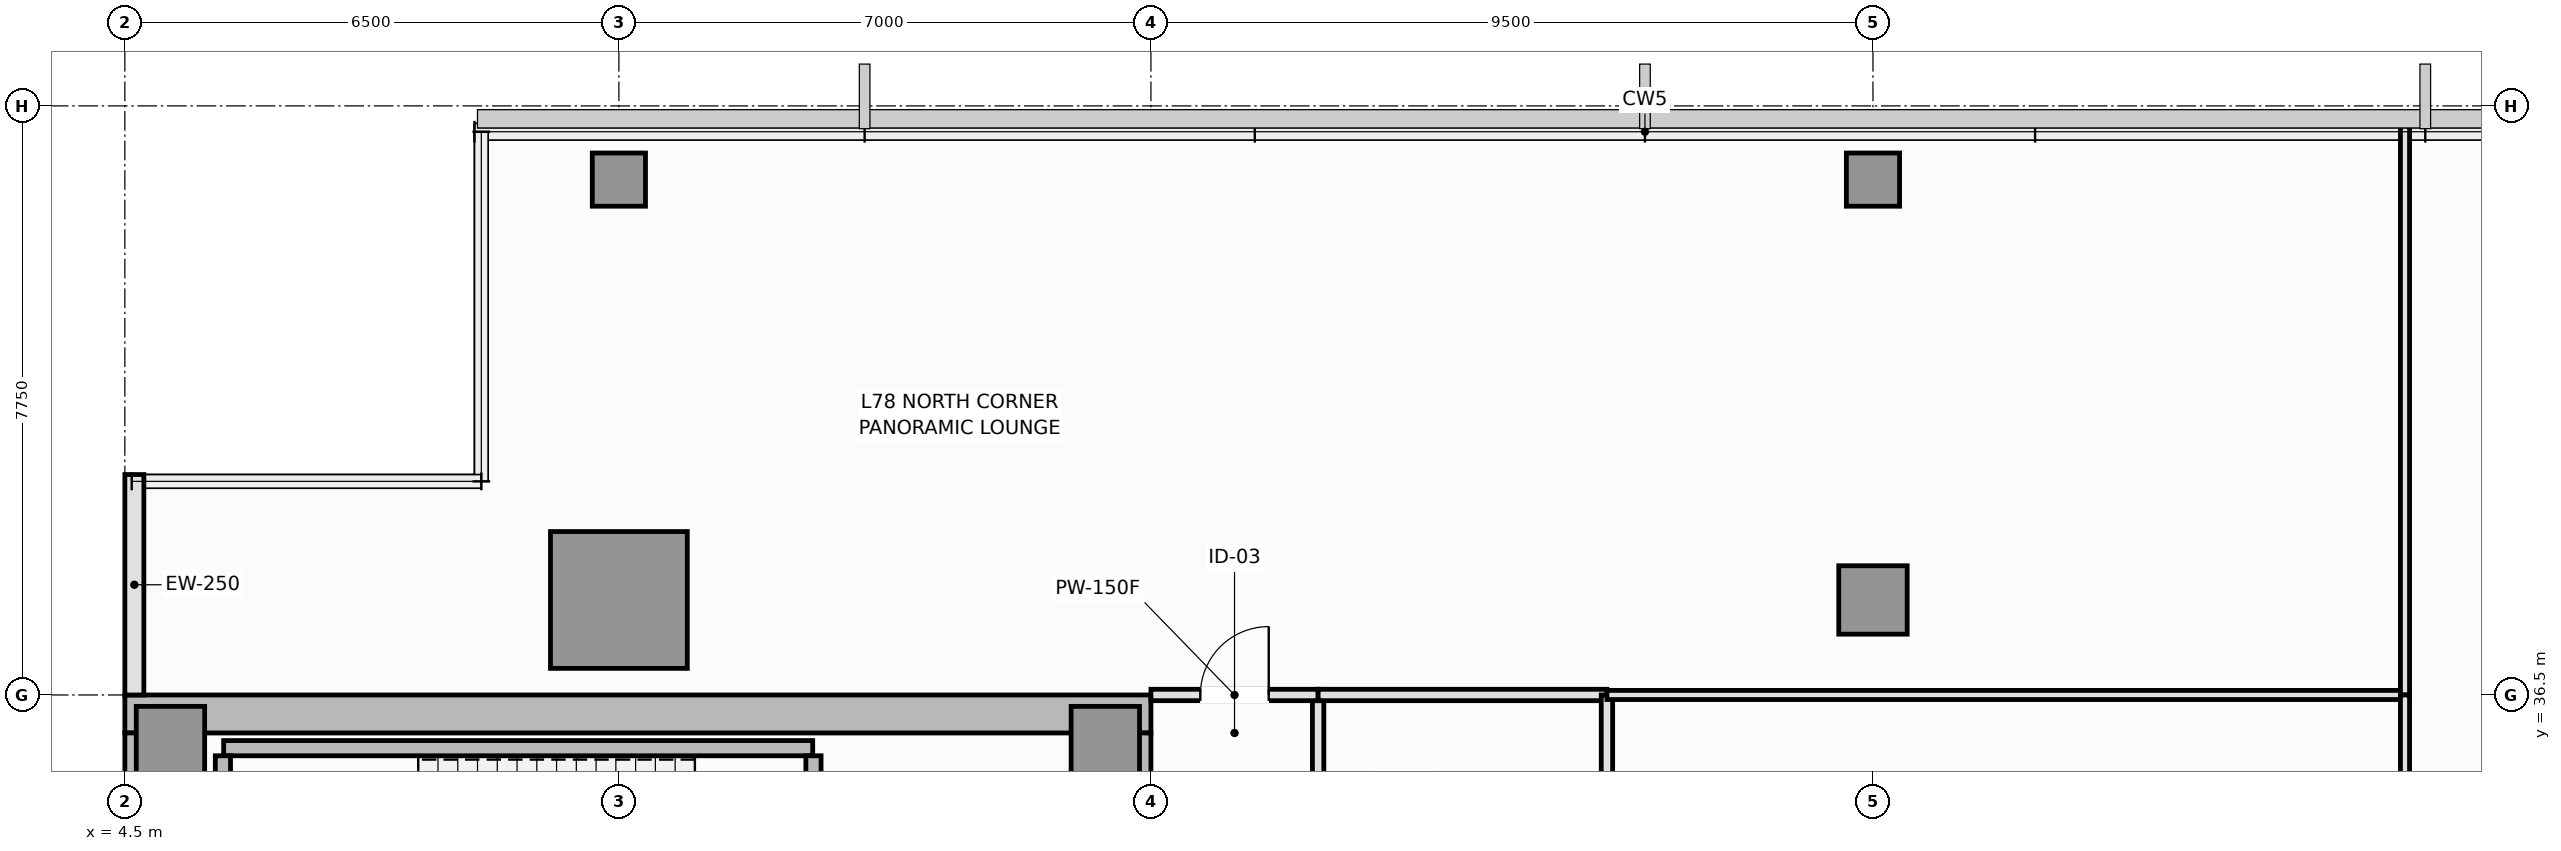
"""IFC4 building model, lengths in metres.
Left out: names, types, materials, properties, quantities, classifications, styles, units other than length and angle.
Written with IfcOpenShell. Run it as: python <this file> out.ifc"""

import sys

from ifc_helpers import new_model, si_unit, direction, frame, frame_2d, origin, origin_2d, place, context, subcontext, project, spatial, rectangle, extrude, element, fill, save


model = new_model("IFC4")
c1 = context("Model", 3, precision=1e-05, world=origin(), true_north=direction((0.0, 1.0)))
c2 = subcontext(c1, "Body", "Model", "MODEL_VIEW")
j1 = project(units=[si_unit("LENGTHUNIT", "METRE"), si_unit("PLANEANGLEUNIT", "RADIAN")], contexts=[c1])
p1 = place(None, origin())
s1 = spatial("IfcSite", under=j1, at=p1, CompositionType="ELEMENT")
p2 = place(p1, origin())
s2 = spatial("IfcBuilding", under=s1, at=p2, CompositionType="ELEMENT")
p3 = place(p2, frame((0.0, 0.0, 291.85)))
s3 = spatial("IfcBuildingStorey", under=s2, at=p3, CompositionType="ELEMENT", Elevation=291.85)
p4 = place(p3, frame((4.5, 36.25, 0.0), z_axis=(0.0, 0.0, 1.0), x_axis=(1.0, 0.0, 0.0)))
e1 = element("IfcWall", 1, at=p4, inside=s3, PredefinedType="SHEAR", context=c2, shape_type="SweptSolid", body=[
    extrude(rectangle(XDim=13.5, YDim=0.5, at=frame_2d((6.75, 0.0))), origin(), (0.0, 0.0, 1.0), 4.8),
])
p5 = place(p3, frame((4.75, 14.5, 0.0), z_axis=(0.0, 0.0, 1.0), x_axis=(0.0, 1.0, 0.0)))
e2 = element("IfcWall", 2, at=p5, inside=s3, PredefinedType="SHEAR", context=c2, shape_type="SweptSolid", body=[
    extrude(rectangle(XDim=21.5, YDim=0.5, at=frame_2d((10.75, 0.0))), origin(), (0.0, 0.0, 1.0), 4.8),
])
p6 = place(p3, frame((17.75, 27.05, 0.0), z_axis=(0.0, 0.0, 1.0), x_axis=(0.0, 1.0, 0.0)))
e3 = element("IfcWall", 3, at=p6, inside=s3, PredefinedType="SHEAR", context=c2, shape_type="SweptSolid", body=[
    extrude(rectangle(XDim=8.95, YDim=0.5, at=frame_2d((4.475, 0.0))), origin(), (0.0, 0.0, 1.0), 4.8),
])
p7 = place(p6, frame((3.45, 0.0, 0.0)))
e4 = element("IfcOpeningElement", 4, at=p7, cuts=e3, PredefinedType="OPENING", context=c2, shape_type="SweptSolid", body=[
    extrude(rectangle(XDim=1.1, YDim=2.15, at=frame_2d((0.55, 1.075))), frame((0.0, 0.26, 0.0), z_axis=(0.0, -1.0, 0.0), x_axis=(1.0, 0.0, 0.0)), (0.0, 0.0, 1.0), 0.52),
])
for number, where, z_axis, x_axis in (
    (5, (5.1, 35.9, 0.0), (0.0, 0.0, 1.0), (1.0, 0.0, 0.0)),
    (6, (17.4, 35.9, 0.0), (0.0, 0.0, 1.0), (1.0, 0.0, 0.0)),
):
    element("IfcColumn", number, at=place(p3, frame(where, z_axis=z_axis, x_axis=x_axis)), inside=s3, PredefinedType="PILASTER", context=c2, shape_type="SweptSolid", body=[
        extrude(rectangle(XDim=0.9, YDim=0.9, at=origin_2d()), origin(), (0.0, 0.0, 1.0), 4.8),
    ])
p8 = place(p3, frame((11.0, 37.75, 0.0), z_axis=(0.0, 0.0, 1.0), x_axis=(1.0, 0.0, 0.0)))
e7 = element("IfcColumn", 7, at=p8, inside=s3, PredefinedType="COLUMN", context=c2, shape_type="SweptSolid", body=[
    extrude(rectangle(XDim=1.8, YDim=1.8, at=origin_2d()), origin(), (0.0, 0.0, 1.0), 4.8),
])
p9 = place(p3, frame((27.5, 37.75, 0.0), z_axis=(0.0, 0.0, 1.0), x_axis=(1.0, 0.0, 0.0)))
e8 = element("IfcColumn", 8, at=p9, inside=s3, PredefinedType="COLUMN", context=c2, shape_type="SweptSolid", body=[
    extrude(rectangle(XDim=0.9, YDim=0.9, at=origin_2d()), origin(), (0.0, 0.0, 1.0), 4.8),
])
for number, where, z_axis, x_axis in (
    (9, (11.0, 43.28, 0.0), (0.0, 0.0, 1.0), (1.0, 0.0, 0.0)),
    (10, (27.5, 43.28, 0.0), (0.0, 0.0, 1.0), (1.0, 0.0, 0.0)),
):
    element("IfcColumn", number, at=place(p3, frame(where, z_axis=z_axis, x_axis=x_axis)), inside=s3, PredefinedType="COLUMN", context=c2, shape_type="SweptSolid", body=[
        extrude(rectangle(XDim=0.7, YDim=0.7, at=origin_2d()), origin(), (0.0, 0.0, 1.0), 4.8),
    ])
p10 = place(p3, frame((4.625, 39.4, 0.0), z_axis=(0.0, 0.0, 1.0), x_axis=(0.0, -1.0, 0.0)))
e11 = element("IfcWall", 11, at=p10, inside=s3, PredefinedType="SOLIDWALL", context=c2, shape_type="SweptSolid", body=[
    extrude(rectangle(XDim=2.9, YDim=0.25, at=frame_2d((1.45, 0.0))), origin(), (0.0, 0.0, 1.0), 4.6),
])
p11 = place(p3, frame((5.8, 35.8, 0.0), z_axis=(0.0, 0.0, 1.0), x_axis=(1.0, 0.0, 0.0)))
e12 = element("IfcWall", 12, at=p11, inside=s3, PredefinedType="SOLIDWALL", context=c2, shape_type="SweptSolid", body=[
    extrude(rectangle(XDim=7.75, YDim=0.2, at=frame_2d((3.875, 0.0))), origin(), (0.0, 0.0, 1.0), 4.8),
])
p12 = place(p3, frame((5.79, 32.65, 0.0), z_axis=(0.0, 0.0, 1.0), x_axis=(0.0, 1.0, 0.0)))
e13 = element("IfcWall", 13, at=p12, inside=s3, PredefinedType="SOLIDWALL", context=c2, shape_type="SweptSolid", body=[
    extrude(rectangle(XDim=3.05, YDim=0.2, at=frame_2d((1.525, 0.0))), origin(), (0.0, 0.0, 1.0), 4.8),
])
p13 = place(p3, frame((13.56, 32.65, 0.0), z_axis=(0.0, 0.0, 1.0), x_axis=(0.0, 1.0, 0.0)))
e14 = element("IfcWall", 14, at=p13, inside=s3, PredefinedType="SOLIDWALL", context=c2, shape_type="SweptSolid", body=[
    extrude(rectangle(XDim=3.05, YDim=0.2, at=frame_2d((1.525, 0.0))), origin(), (0.0, 0.0, 1.0), 4.8),
])
p14 = place(p13, frame((0.95, 0.0, 0.0)))
e15 = element("IfcOpeningElement", 15, at=p14, cuts=e14, PredefinedType="OPENING", context=c2, shape_type="SweptSolid", body=[
    extrude(rectangle(XDim=1.15, YDim=2.15, at=frame_2d((0.575, 1.075))), frame((0.0, 0.11, 0.0), z_axis=(0.0, -1.0, 0.0), x_axis=(1.0, 0.0, 0.0)), (0.0, 0.0, 1.0), 0.22),
])
p15 = place(p3, frame((20.2, 33.1, 0.0), z_axis=(0.0, 0.0, 1.0), x_axis=(0.0, 1.0, 0.0)))
e16 = element("IfcWall", 16, at=p15, inside=s3, PredefinedType="PLUMBINGWALL", context=c2, shape_type="SweptSolid", body=[
    extrude(rectangle(XDim=3.4, YDim=0.15, at=frame_2d((1.7, 0.0))), origin(), (0.0, 0.0, 1.0), 4.6),
])
p16 = place(p15, frame((1.25, 0.0, 0.0)))
e17 = element("IfcOpeningElement", 17, at=p16, cuts=e16, PredefinedType="OPENING", context=c2, shape_type="SweptSolid", body=[
    extrude(rectangle(XDim=0.9, YDim=2.1, at=frame_2d((0.45, 1.05))), frame((0.0, 0.085, 0.0), z_axis=(0.0, -1.0, 0.0), x_axis=(1.0, 0.0, 0.0)), (0.0, 0.0, 1.0), 0.17),
])
p17 = place(p3, frame((18.0, 36.5, 0.0), z_axis=(0.0, 0.0, 1.0), x_axis=(1.0, 0.0, 0.0)))
e18 = element("IfcWall", 18, at=p17, inside=s3, PredefinedType="PARTITIONING", context=c2, shape_type="SweptSolid", body=[
    extrude(rectangle(XDim=2.2, YDim=0.15, at=frame_2d((1.1, 0.0))), origin(), (0.0, 0.0, 1.0), 4.6),
])
p18 = place(p17, frame((0.65, 0.0, 0.0)))
e19 = element("IfcOpeningElement", 19, at=p18, cuts=e18, PredefinedType="OPENING", context=c2, shape_type="SweptSolid", body=[
    extrude(rectangle(XDim=0.9, YDim=2.1, at=frame_2d((0.45, 1.05))), frame((0.0, 0.085, 0.0), z_axis=(0.0, -1.0, 0.0), x_axis=(1.0, 0.0, 0.0)), (0.0, 0.0, 1.0), 0.17),
])
p19 = place(p3, frame((20.2, 36.5, 0.0), z_axis=(0.0, 0.0, 1.0), x_axis=(1.0, 0.0, 0.0)))
e20 = element("IfcWall", 20, at=p19, inside=s3, PredefinedType="PLUMBINGWALL", context=c2, shape_type="SweptSolid", body=[
    extrude(rectangle(XDim=3.8, YDim=0.15, at=frame_2d((1.9, 0.0))), origin(), (0.0, 0.0, 1.0), 4.6),
])
p20 = place(p3, frame((24.0, 33.1, 0.0), z_axis=(0.0, 0.0, 1.0), x_axis=(0.0, 1.0, 0.0)))
e21 = element("IfcWall", 21, at=p20, inside=s3, PredefinedType="PLUMBINGWALL", context=c2, shape_type="SweptSolid", body=[
    extrude(rectangle(XDim=3.4, YDim=0.15, at=frame_2d((1.7, 0.0))), origin(), (0.0, 0.0, 1.0), 4.15),
])
p21 = place(p3, frame((24.0, 36.5, 0.0), z_axis=(0.0, 0.0, 1.0), x_axis=(1.0, 0.0, 0.0)))
e22 = element("IfcWall", 22, at=p21, inside=s3, PredefinedType="PARTITIONING", context=c2, shape_type="SweptSolid", body=[
    extrude(rectangle(XDim=10.5, YDim=0.12, at=frame_2d((5.25, 0.0))), origin(), (0.0, 0.0, 1.0), 4.6),
])
p22 = place(p3, frame((34.5, 36.5, 0.0), z_axis=(0.0, 0.0, 1.0), x_axis=(0.0, 1.0, 0.0)))
e23 = element("IfcWall", 23, at=p22, inside=s3, PredefinedType="PARTITIONING", context=c2, shape_type="SweptSolid", body=[
    extrude(rectangle(XDim=7.49, YDim=0.12, at=frame_2d((3.745, 0.0))), origin(), (0.0, 0.0, 1.0), 4.15),
])
p23 = place(p3, frame((34.5, 26.7, 0.0), z_axis=(0.0, 0.0, 1.0), x_axis=(0.0, 1.0, 0.0)))
e24 = element("IfcWall", 24, at=p23, inside=s3, PredefinedType="PARTITIONING", context=c2, shape_type="SweptSolid", body=[
    extrude(rectangle(XDim=9.8, YDim=0.12, at=frame_2d((4.9, 0.0))), origin(), (0.0, 0.0, 1.0), 4.6),
])
p24 = place(p18, origin())
e25 = element("IfcDoor", 25, at=p24, inside=s3, OperationType="SINGLE_SWING_RIGHT", PredefinedType="DOOR", context=c2, shape_type="SweptSolid", body=[
    extrude(rectangle(XDim=0.9, YDim=2.1, at=frame_2d((0.45, 1.05))), frame((0.0, 0.025, 0.0), z_axis=(0.0, -1.0, 0.0), x_axis=(1.0, 0.0, 0.0)), (0.0, 0.0, 1.0), 0.05),
])
fill(e19, e25)
save(model, sys.argv[1])
